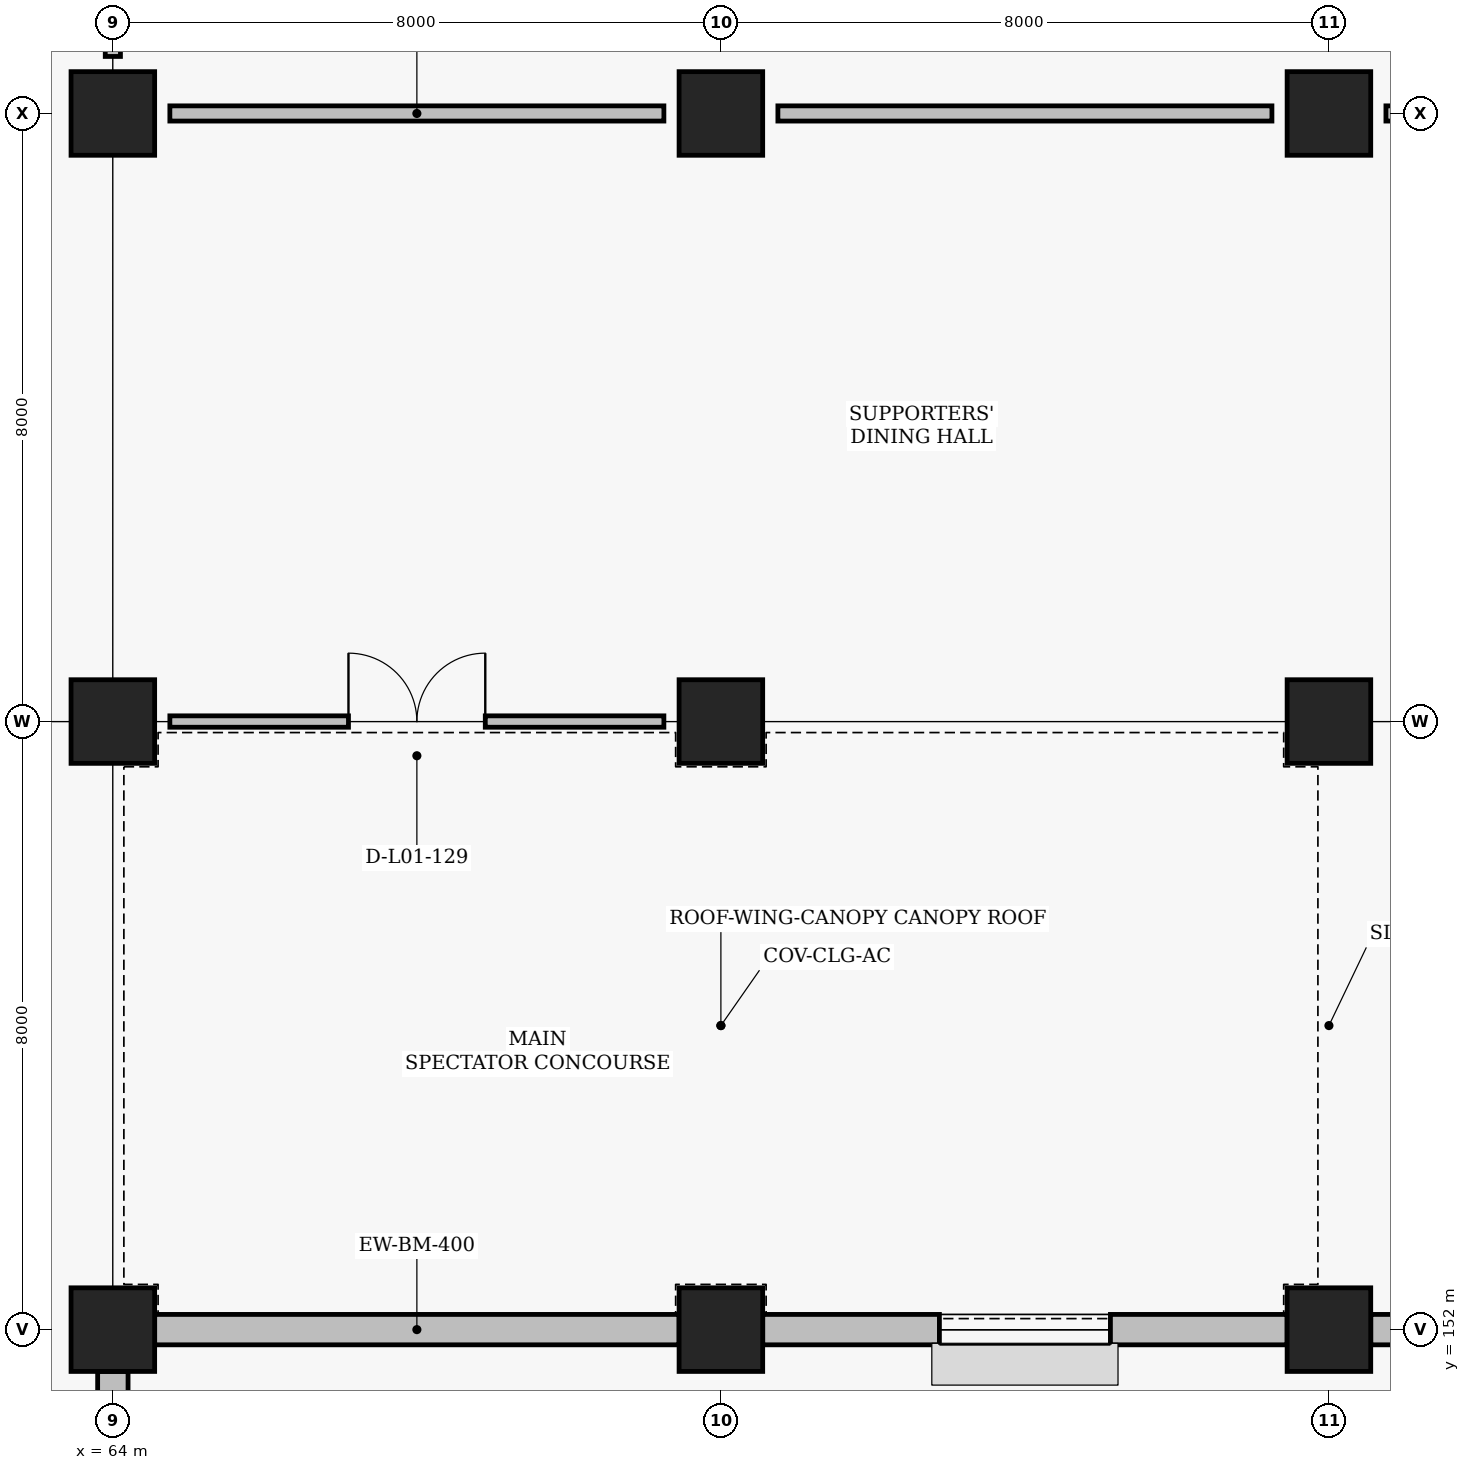
"""IFC4 building model, lengths in metres.
Left out: names, types, materials, properties, quantities, classifications, styles, units other than length and angle.
Written with IfcOpenShell. Run it as: python <this file> out.ifc"""

import sys

from ifc_helpers import new_model, si_unit, direction, frame, frame_2d, origin, origin_2d, place, context, subcontext, project, spatial, rectangle, extrude, element, fill, save


model = new_model("IFC4")
c1 = context("Model", 3, precision=1e-05, world=origin(), true_north=direction((0.0, 1.0)))
c2 = subcontext(c1, "Body", "Model", "MODEL_VIEW")
j1 = project(units=[si_unit("LENGTHUNIT", "METRE"), si_unit("PLANEANGLEUNIT", "RADIAN")], contexts=[c1])
p1 = place(None, origin())
s1 = spatial("IfcSite", under=j1, at=p1, CompositionType="ELEMENT")
p2 = place(p1, origin())
s2 = spatial("IfcBuilding", under=s1, at=p2, CompositionType="ELEMENT")
p3 = place(p2, origin())
s3 = spatial("IfcBuildingStorey", under=s2, at=p3, CompositionType="ELEMENT", Elevation=0.0)
for number, where, z_axis, x_axis in (
    (1, (64.0, 152.0, 0.0), (0.0, 0.0, 1.0), (1.0, 0.0, 0.0)),
    (2, (64.0, 160.0, 0.0), (0.0, 0.0, 1.0), (1.0, 0.0, 0.0)),
    (3, (64.0, 168.0, 0.0), (0.0, 0.0, 1.0), (1.0, 0.0, 0.0)),
    (4, (72.0, 152.0, 0.0), (0.0, 0.0, 1.0), (1.0, 0.0, 0.0)),
    (5, (72.0, 160.0, 0.0), (0.0, 0.0, 1.0), (1.0, 0.0, 0.0)),
    (6, (72.0, 168.0, 0.0), (0.0, 0.0, 1.0), (1.0, 0.0, 0.0)),
    (7, (80.0, 152.0, 0.0), (0.0, 0.0, 1.0), (1.0, 0.0, 0.0)),
    (8, (80.0, 160.0, 0.0), (0.0, 0.0, 1.0), (1.0, 0.0, 0.0)),
    (9, (80.0, 168.0, 0.0), (0.0, 0.0, 1.0), (1.0, 0.0, 0.0)),
):
    element("IfcColumn", number, at=place(p3, frame(where, z_axis=z_axis, x_axis=x_axis)), inside=s3, PredefinedType="COLUMN", context=c2, shape_type="SweptSolid", body=[
        extrude(rectangle(XDim=1.1, YDim=1.1, at=origin_2d()), origin(), (0.0, 0.0, 1.0), 4.8),
    ])
p4 = place(p3, frame((64.0, 144.55, 0.0), z_axis=(0.0, 0.0, 1.0), x_axis=(0.0, 1.0, 0.0)))
e10 = element("IfcWall", 10, at=p4, inside=s3, PredefinedType="SOLIDWALL", context=c2, shape_type="SweptSolid", body=[
    extrude(rectangle(XDim=6.9, YDim=0.4, at=frame_2d((3.45, 0.0))), origin(), (0.0, 0.0, 1.0), 3.62),
])
p5 = place(p4, frame((2.4, 0.0, 0.95)))
e11 = element("IfcOpeningElement", 11, at=p5, cuts=e10, PredefinedType="OPENING", context=c2, shape_type="SweptSolid", body=[
    extrude(rectangle(XDim=2.1, YDim=1.9, at=frame_2d((1.05, 0.95))), frame((0.0, 0.21, 0.0), z_axis=(0.0, -1.0, 0.0), x_axis=(1.0, 0.0, 0.0)), (0.0, 0.0, 1.0), 0.42),
])
p6 = place(p3, frame((64.55, 152.0, 0.0), z_axis=(0.0, 0.0, 1.0), x_axis=(1.0, 0.0, 0.0)))
e12 = element("IfcWall", 12, at=p6, inside=s3, PredefinedType="SOLIDWALL", context=c2, shape_type="SweptSolid", body=[
    extrude(rectangle(XDim=6.9, YDim=0.4, at=frame_2d((3.45, 0.0))), origin(), (0.0, 0.0, 1.0), 3.77),
])
p7 = place(p3, frame((72.55, 152.0, 0.0), z_axis=(0.0, 0.0, 1.0), x_axis=(1.0, 0.0, 0.0)))
e13 = element("IfcWall", 13, at=p7, inside=s3, PredefinedType="SOLIDWALL", context=c2, shape_type="SweptSolid", body=[
    extrude(rectangle(XDim=6.9, YDim=0.4, at=frame_2d((3.45, 0.0))), origin(), (0.0, 0.0, 1.0), 3.81),
])
p8 = place(p7, frame((2.325, 0.0, 0.95)))
e14 = element("IfcOpeningElement", 14, at=p8, cuts=e13, PredefinedType="OPENING", context=c2, shape_type="SweptSolid", body=[
    extrude(rectangle(XDim=2.25, YDim=1.9, at=frame_2d((1.125, 0.95))), frame((0.0, 0.21, 0.0), z_axis=(0.0, -1.0, 0.0), x_axis=(1.0, 0.0, 0.0)), (0.0, 0.0, 1.0), 0.42),
])
p9 = place(p3, frame((80.55, 152.0, 0.0), z_axis=(0.0, 0.0, 1.0), x_axis=(1.0, 0.0, 0.0)))
e15 = element("IfcWall", 15, at=p9, inside=s3, PredefinedType="SOLIDWALL", context=c2, shape_type="SweptSolid", body=[
    extrude(rectangle(XDim=6.9, YDim=0.4, at=frame_2d((3.45, 0.0))), origin(), (0.0, 0.0, 1.0), 3.81),
])
p10 = place(p3, frame((64.0, 168.75, 0.0), z_axis=(0.0, 0.0, 1.0), x_axis=(0.0, 1.0, 0.0)))
e16 = element("IfcWall", 16, at=p10, inside=s3, PredefinedType="PARTITIONING", context=c2, shape_type="SweptSolid", body=[
    extrude(rectangle(XDim=8.5, YDim=0.2, at=frame_2d((4.25, 0.0))), origin(), (0.0, 0.0, 1.0), 3.71),
])
p11 = place(p10, frame((3.7, 0.0, 0.0)))
e17 = element("IfcOpeningElement", 17, at=p11, cuts=e16, PredefinedType="OPENING", context=c2, shape_type="SweptSolid", body=[
    extrude(rectangle(XDim=1.1, YDim=2.2, at=frame_2d((0.55, 1.1))), frame((0.0, 0.11, 0.0), z_axis=(0.0, -1.0, 0.0), x_axis=(1.0, 0.0, 0.0)), (0.0, 0.0, 1.0), 0.22),
])
p12 = place(p3, frame((64.75, 168.0, 0.0), z_axis=(0.0, 0.0, 1.0), x_axis=(1.0, 0.0, 0.0)))
e18 = element("IfcWall", 18, at=p12, inside=s3, PredefinedType="PARTITIONING", context=c2, shape_type="SweptSolid", body=[
    extrude(rectangle(XDim=6.5, YDim=0.2, at=frame_2d((3.25, 0.0))), origin(), (0.0, 0.0, 1.0), 3.91),
])
p13 = place(p3, frame((72.75, 168.0, 0.0), z_axis=(0.0, 0.0, 1.0), x_axis=(1.0, 0.0, 0.0)))
e19 = element("IfcWall", 19, at=p13, inside=s3, PredefinedType="PARTITIONING", context=c2, shape_type="SweptSolid", body=[
    extrude(rectangle(XDim=6.5, YDim=0.2, at=frame_2d((3.25, 0.0))), origin(), (0.0, 0.0, 1.0), 3.66),
])
p14 = place(p3, frame((80.75, 168.0, 0.0), z_axis=(0.0, 0.0, 1.0), x_axis=(1.0, 0.0, 0.0)))
e20 = element("IfcWall", 20, at=p14, inside=s3, PredefinedType="PARTITIONING", context=c2, shape_type="SweptSolid", body=[
    extrude(rectangle(XDim=6.5, YDim=0.2, at=frame_2d((3.25, 0.0))), origin(), (0.0, 0.0, 1.0), 3.91),
])
p15 = place(p3, frame((64.75, 160.0, 0.0), z_axis=(0.0, 0.0, 1.0), x_axis=(1.0, 0.0, 0.0)))
e21 = element("IfcWall", 21, at=p15, inside=s3, PredefinedType="PARTITIONING", context=c2, shape_type="SweptSolid", body=[
    extrude(rectangle(XDim=6.5, YDim=0.15, at=frame_2d((3.25, 0.0))), origin(), (0.0, 0.0, 1.0), 3.91),
])
p16 = place(p15, frame((2.35, 0.0, 0.0)))
e22 = element("IfcOpeningElement", 22, at=p16, cuts=e21, PredefinedType="OPENING", context=c2, shape_type="SweptSolid", body=[
    extrude(rectangle(XDim=1.8, YDim=2.3, at=frame_2d((0.9, 1.15))), frame((0.0, 0.085, 0.0), z_axis=(0.0, -1.0, 0.0), x_axis=(1.0, 0.0, 0.0)), (0.0, 0.0, 1.0), 0.17),
])
p17 = place(p8, origin())
e23 = element("IfcWindow", 23, at=p17, inside=s3, PartitioningType="SINGLE_PANEL", PredefinedType="WINDOW", context=c2, shape_type="SweptSolid", body=[
    extrude(rectangle(XDim=2.25, YDim=1.9, at=frame_2d((1.125, 0.95))), frame((0.0, 0.03, 0.0), z_axis=(0.0, -1.0, 0.0), x_axis=(1.0, 0.0, 0.0)), (0.0, 0.0, 1.0), 0.06),
])
fill(e14, e23)
p18 = place(p16, origin())
e24 = element("IfcDoor", 24, at=p18, inside=s3, OperationType="DOUBLE_SWING_LEFT", PredefinedType="DOOR", context=c2, shape_type="SweptSolid", body=[
    extrude(rectangle(XDim=1.8, YDim=2.3, at=frame_2d((0.9, 1.15))), frame((0.0, 0.025, 0.0), z_axis=(0.0, -1.0, 0.0), x_axis=(1.0, 0.0, 0.0)), (0.0, 0.0, 1.0), 0.05),
])
fill(e22, e24)
save(model, sys.argv[1])
